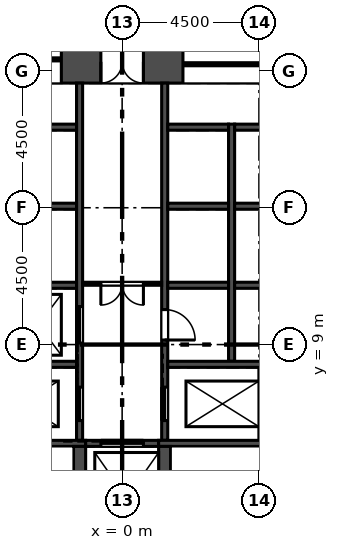
"""IFC4 building model, lengths in metres.
Left out: names, types, materials, properties, quantities, classifications, styles, units other than length and angle.
Written with IfcOpenShell. Run it as: python <this file> out.ifc"""

import sys

from ifc_helpers import new_model, si_unit, direction, frame, frame_2d, origin, place, context, subcontext, project, spatial, rectangle, extrude, element, fill, save


model = new_model("IFC4")
c1 = context("Model", 3, precision=1e-05, world=origin(), true_north=direction((0.0, 1.0)))
c2 = subcontext(c1, "Body", "Model", "MODEL_VIEW")
j1 = project(units=[si_unit("LENGTHUNIT", "METRE"), si_unit("PLANEANGLEUNIT", "RADIAN")], contexts=[c1])
p1 = place(None, origin())
s1 = spatial("IfcSite", under=j1, at=p1, CompositionType="ELEMENT")
p2 = place(p1, origin())
s2 = spatial("IfcBuilding", under=s1, at=p2, CompositionType="ELEMENT")
p3 = place(p2, frame((0.0, 0.0, 14.0)))
s3 = spatial("IfcBuildingStorey", under=s2, at=p3, CompositionType="ELEMENT", Elevation=14.0)
p4 = place(p3, frame((9.412, 18.3, 0.0), z_axis=(0.0, 0.0, 1.0), x_axis=(-1.0, 0.0, 0.0)))
e1 = element("IfcWall", 1, at=p4, inside=s3, PredefinedType="SHEAR", context=c2, shape_type="SweptSolid", body=[
    extrude(rectangle(XDim=18.823, YDim=1.4, at=frame_2d((9.412, 0.0))), origin(), (0.0, 0.0, 1.0), 6.0),
])
p5 = place(p4, frame((8.711, 0.0, 0.0)))
e2 = element("IfcOpeningElement", 2, at=p5, cuts=e1, PredefinedType="OPENING", context=c2, shape_type="SweptSolid", body=[
    extrude(rectangle(XDim=1.4, YDim=2.1, at=frame_2d((0.7, 1.05))), frame((0.0, 0.71, 0.0), z_axis=(0.0, -1.0, 0.0), x_axis=(1.0, 0.0, 0.0)), (0.0, 0.0, 1.0), 1.42),
])
p6 = place(p4, frame((11.412, 0.0, 0.0)))
e3 = element("IfcOpeningElement", 3, at=p6, cuts=e1, PredefinedType="OPENING", context=c2, shape_type="SweptSolid", body=[
    extrude(rectangle(XDim=6.0, YDim=2.4, at=frame_2d((3.0, 1.2))), frame((0.0, 0.71, 0.0), z_axis=(0.0, -1.0, 0.0), x_axis=(1.0, 0.0, 0.0)), (0.0, 0.0, 1.0), 1.42),
])
p7 = place(p4, frame((1.412, 0.0, 0.0)))
e4 = element("IfcOpeningElement", 4, at=p7, cuts=e1, PredefinedType="OPENING", context=c2, shape_type="SweptSolid", body=[
    extrude(rectangle(XDim=6.0, YDim=2.4, at=frame_2d((3.0, 1.2))), frame((0.0, 0.71, 0.0), z_axis=(0.0, -1.0, 0.0), x_axis=(1.0, 0.0, 0.0)), (0.0, 0.0, 1.0), 1.42),
])
p8 = place(p3, frame((3.6, 8.45, -0.3), z_axis=(0.0, 0.0, 1.0), x_axis=(0.0, 1.0, 0.0)))
e5 = element("IfcWall", 5, at=p8, inside=s3, PredefinedType="SOLIDWALL", context=c2, shape_type="SweptSolid", body=[
    extrude(rectangle(XDim=7.8, YDim=0.2, at=frame_2d((3.9, 0.0))), origin(), (0.0, 0.0, 1.0), 6.0),
])
p9 = place(p3, frame((-1.4, 5.85, -0.3), z_axis=(0.0, 0.0, 1.0), x_axis=(0.0, 1.0, 0.0)))
e6 = element("IfcWall", 6, at=p9, inside=s3, PredefinedType="SOLIDWALL", context=c2, shape_type="SweptSolid", body=[
    extrude(rectangle(XDim=11.75, YDim=0.2, at=frame_2d((5.875, 0.0))), origin(), (0.0, 0.0, 1.0), 6.0),
])
p10 = place(p9, frame((3.2, 0.0, 0.3)))
e7 = element("IfcOpeningElement", 7, at=p10, cuts=e6, PredefinedType="OPENING", context=c2, shape_type="SweptSolid", body=[
    extrude(rectangle(XDim=1.2, YDim=2.1, at=frame_2d((0.6, 1.05))), frame((0.0, 0.11, 0.0), z_axis=(0.0, -1.0, 0.0), x_axis=(1.0, 0.0, 0.0)), (0.0, 0.0, 1.0), 0.22),
])
p11 = place(p9, frame((0.65, 0.0, 0.3)))
e8 = element("IfcOpeningElement", 8, at=p11, cuts=e6, PredefinedType="OPENING", context=c2, shape_type="SweptSolid", body=[
    extrude(rectangle(XDim=1.1, YDim=2.1, at=frame_2d((0.55, 1.05))), frame((0.0, 0.11, 0.0), z_axis=(0.0, -1.0, 0.0), x_axis=(1.0, 0.0, 0.0)), (0.0, 0.0, 1.0), 0.22),
])
p12 = place(p3, frame((1.4, 5.85, -0.3), z_axis=(0.0, 0.0, 1.0), x_axis=(0.0, 1.0, 0.0)))
e9 = element("IfcWall", 9, at=p12, inside=s3, PredefinedType="SOLIDWALL", context=c2, shape_type="SweptSolid", body=[
    extrude(rectangle(XDim=11.75, YDim=0.2, at=frame_2d((5.875, 0.0))), origin(), (0.0, 0.0, 1.0), 6.0),
])
p13 = place(p12, frame((0.65, 0.0, 0.3)))
e10 = element("IfcOpeningElement", 10, at=p13, cuts=e9, PredefinedType="OPENING", context=c2, shape_type="SweptSolid", body=[
    extrude(rectangle(XDim=1.1, YDim=2.1, at=frame_2d((0.55, 1.05))), frame((0.0, 0.11, 0.0), z_axis=(0.0, -1.0, 0.0), x_axis=(1.0, 0.0, 0.0)), (0.0, 0.0, 1.0), 0.22),
])
p14 = place(p12, frame((3.3, 0.0, 0.3)))
e11 = element("IfcOpeningElement", 11, at=p14, cuts=e9, PredefinedType="OPENING", context=c2, shape_type="SweptSolid", body=[
    extrude(rectangle(XDim=1.0, YDim=2.1, at=frame_2d((0.5, 1.05))), frame((0.0, 0.11, 0.0), z_axis=(0.0, -1.0, 0.0), x_axis=(1.0, 0.0, 0.0)), (0.0, 0.0, 1.0), 0.22),
])
for number, where, z_axis, x_axis in (
    (12, (-5.7, 8.35, -0.3), (0.0, 0.0, 1.0), (1.0, 0.0, 0.0)),
    (13, (1.5, 8.35, -0.3), (0.0, 0.0, 1.0), (1.0, 0.0, 0.0)),
):
    element("IfcWall", number, at=place(p3, frame(where, z_axis=z_axis, x_axis=x_axis)), inside=s3, PredefinedType="SOLIDWALL", context=c2, shape_type="SweptSolid", body=[
        extrude(rectangle(XDim=4.2, YDim=0.2, at=frame_2d((2.1, 0.0))), origin(), (0.0, 0.0, 1.0), 6.0),
    ])
p15 = place(p3, frame((-12.6, 5.75, -0.3), z_axis=(0.0, 0.0, 1.0), x_axis=(1.0, 0.0, 0.0)))
e14 = element("IfcWall", 14, at=p15, inside=s3, PredefinedType="SOLIDWALL", context=c2, shape_type="SweptSolid", body=[
    extrude(rectangle(XDim=11.4, YDim=0.2, at=frame_2d((5.7, 0.0))), origin(), (0.0, 0.0, 1.0), 6.0),
])
p16 = place(p3, frame((-1.2, 5.75, -0.3), z_axis=(0.0, 0.0, 1.0), x_axis=(1.0, 0.0, 0.0)))
e15 = element("IfcWall", 15, at=p16, inside=s3, PredefinedType="SOLIDWALL", context=c2, shape_type="SweptSolid", body=[
    extrude(rectangle(XDim=2.4, YDim=0.2, at=frame_2d((1.2, 0.0))), origin(), (0.0, 0.0, 1.0), 6.0),
])
p17 = place(p16, frame((0.5, 0.0, 0.3)))
e16 = element("IfcOpeningElement", 16, at=p17, cuts=e15, PredefinedType="OPENING", context=c2, shape_type="SweptSolid", body=[
    extrude(rectangle(XDim=1.4, YDim=2.1, at=frame_2d((0.7, 1.05))), frame((0.0, 0.11, 0.0), z_axis=(0.0, -1.0, 0.0), x_axis=(1.0, 0.0, 0.0)), (0.0, 0.0, 1.0), 0.22),
])
p18 = place(p3, frame((1.2, 5.75, -0.3), z_axis=(0.0, 0.0, 1.0), x_axis=(1.0, 0.0, 0.0)))
e17 = element("IfcWall", 17, at=p18, inside=s3, PredefinedType="SOLIDWALL", context=c2, shape_type="SweptSolid", body=[
    extrude(rectangle(XDim=11.4, YDim=0.2, at=frame_2d((5.7, 0.0))), origin(), (0.0, 0.0, 1.0), 6.0),
])
for number, where, z_axis, x_axis in (
    (18, (-1.4, 2.25, -0.3), (0.0, 0.0, 1.0), (0.0, 1.0, 0.0)),
    (19, (1.4, 2.25, -0.3), (0.0, 0.0, 1.0), (0.0, 1.0, 0.0)),
):
    element("IfcWall", number, at=place(p3, frame(where, z_axis=z_axis, x_axis=x_axis)), inside=s3, PredefinedType="SOLIDWALL", context=c2, shape_type="SweptSolid", body=[
        extrude(rectangle(XDim=3.4, YDim=0.4, at=frame_2d((1.7, 0.0))), origin(), (0.0, 0.0, 1.0), 6.0),
    ])
for number, where, z_axis, x_axis in (
    (20, (-3.5, 10.95, -0.3), (0.0, 0.0, 1.0), (1.0, 0.0, 0.0)),
    (21, (-3.5, 13.55, -0.3), (0.0, 0.0, 1.0), (1.0, 0.0, 0.0)),
    (22, (-3.5, 16.15, -0.3), (0.0, 0.0, 1.0), (1.0, 0.0, 0.0)),
    (23, (3.7, 10.95, -0.3), (0.0, 0.0, 1.0), (1.0, 0.0, 0.0)),
    (24, (3.7, 13.55, -0.3), (0.0, 0.0, 1.0), (1.0, 0.0, 0.0)),
    (25, (3.7, 16.15, -0.3), (0.0, 0.0, 1.0), (1.0, 0.0, 0.0)),
    (26, (1.5, 10.95, -0.3), (0.0, 0.0, 1.0), (1.0, 0.0, 0.0)),
    (27, (1.5, 13.55, -0.3), (0.0, 0.0, 1.0), (1.0, 0.0, 0.0)),
    (28, (1.5, 16.15, -0.3), (0.0, 0.0, 1.0), (1.0, 0.0, 0.0)),
):
    element("IfcWall", number, at=place(p3, frame(where, z_axis=z_axis, x_axis=x_axis)), inside=s3, PredefinedType="SOLIDWALL", context=c2, shape_type="SweptSolid", body=[
        extrude(rectangle(XDim=2.0, YDim=0.2, at=frame_2d((1.0, 0.0))), origin(), (0.0, 0.0, 1.0), 6.0),
    ])
p19 = place(p3, frame((-1.3, 11.0, 0.0), z_axis=(0.0, 0.0, 1.0), x_axis=(1.0, 0.0, 0.0)))
e29 = element("IfcWall", 29, at=p19, inside=s3, PredefinedType="PARTITIONING", context=c2, shape_type="SweptSolid", body=[
    extrude(rectangle(XDim=2.6, YDim=0.1, at=frame_2d((1.3, 0.0))), origin(), (0.0, 0.0, 1.0), 5.7),
])
p20 = place(p19, frame((0.6, 0.0, 0.0)))
e30 = element("IfcOpeningElement", 30, at=p20, cuts=e29, PredefinedType="OPENING", context=c2, shape_type="SweptSolid", body=[
    extrude(rectangle(XDim=1.4, YDim=2.1, at=frame_2d((0.7, 1.05))), frame((0.0, 0.06, 0.0), z_axis=(0.0, -1.0, 0.0), x_axis=(1.0, 0.0, 0.0)), (0.0, 0.0, 1.0), 0.12),
])
p21 = place(p10, origin())
e31 = element("IfcDoor", 31, at=p21, inside=s3, OperationType="SLIDING_TO_LEFT", PredefinedType="DOOR", context=c2, shape_type="SweptSolid", body=[
    extrude(rectangle(XDim=1.2, YDim=2.1, at=frame_2d((0.6, 1.05))), frame((0.0, 0.025, 0.0), z_axis=(0.0, -1.0, 0.0), x_axis=(1.0, 0.0, 0.0)), (0.0, 0.0, 1.0), 0.05),
])
fill(e7, e31)
p22 = place(p11, origin())
e32 = element("IfcDoor", 32, at=p22, inside=s3, OperationType="SLIDING_TO_RIGHT", PredefinedType="DOOR", context=c2, shape_type="SweptSolid", body=[
    extrude(rectangle(XDim=1.1, YDim=2.1, at=frame_2d((0.55, 1.05))), frame((0.0, 0.025, 0.0), z_axis=(0.0, -1.0, 0.0), x_axis=(1.0, 0.0, 0.0)), (0.0, 0.0, 1.0), 0.05),
])
fill(e8, e32)
p23 = place(p13, origin())
e33 = element("IfcDoor", 33, at=p23, inside=s3, OperationType="SLIDING_TO_RIGHT", PredefinedType="DOOR", context=c2, shape_type="SweptSolid", body=[
    extrude(rectangle(XDim=1.1, YDim=2.1, at=frame_2d((0.55, 1.05))), frame((0.0, 0.025, 0.0), z_axis=(0.0, -1.0, 0.0), x_axis=(1.0, 0.0, 0.0)), (0.0, 0.0, 1.0), 0.05),
])
fill(e10, e33)
p24 = place(p17, origin())
e34 = element("IfcDoor", 34, at=p24, inside=s3, OperationType="SLIDING_TO_LEFT", PredefinedType="DOOR", context=c2, shape_type="SweptSolid", body=[
    extrude(rectangle(XDim=1.4, YDim=2.1, at=frame_2d((0.7, 1.05))), frame((0.0, 0.025, 0.0), z_axis=(0.0, -1.0, 0.0), x_axis=(1.0, 0.0, 0.0)), (0.0, 0.0, 1.0), 0.05),
])
fill(e16, e34)
p25 = place(p14, frame((1.0, 0.0, 0.0), z_axis=(0.0, 0.0, 1.0), x_axis=(-1.0, 0.0, 0.0)))
e35 = element("IfcDoor", 35, at=p25, inside=s3, OperationType="SINGLE_SWING_RIGHT", PredefinedType="DOOR", context=c2, shape_type="SweptSolid", body=[
    extrude(rectangle(XDim=1.0, YDim=2.1, at=frame_2d((0.5, 1.05))), frame((0.0, 0.025, 0.0), z_axis=(0.0, -1.0, 0.0), x_axis=(1.0, 0.0, 0.0)), (0.0, 0.0, 1.0), 0.05),
])
fill(e11, e35)
p26 = place(p20, frame((1.4, 0.0, 0.0), z_axis=(0.0, 0.0, 1.0), x_axis=(-1.0, 0.0, 0.0)))
e36 = element("IfcDoor", 36, at=p26, inside=s3, OperationType="DOUBLE_DOOR_SINGLE_SWING", PredefinedType="DOOR", context=c2, shape_type="SweptSolid", body=[
    extrude(rectangle(XDim=1.4, YDim=2.1, at=frame_2d((0.7, 1.05))), frame((0.0, 0.025, 0.0), z_axis=(0.0, -1.0, 0.0), x_axis=(1.0, 0.0, 0.0)), (0.0, 0.0, 1.0), 0.05),
])
fill(e30, e36)
p27 = place(p5, origin())
e37 = element("IfcDoor", 37, at=p27, inside=s3, OperationType="DOUBLE_DOOR_SINGLE_SWING", PredefinedType="DOOR", context=c2, shape_type="SweptSolid", body=[
    extrude(rectangle(XDim=1.4, YDim=2.1, at=frame_2d((0.7, 1.05))), frame((0.0, 0.025, 0.0), z_axis=(0.0, -1.0, 0.0), x_axis=(1.0, 0.0, 0.0)), (0.0, 0.0, 1.0), 0.05),
])
fill(e2, e37)
p28 = place(p6, origin())
e38 = element("IfcDoor", 38, at=p28, inside=s3, OperationType="DOUBLE_DOOR_SLIDING", PredefinedType="DOOR", context=c2, shape_type="SweptSolid", body=[
    extrude(rectangle(XDim=6.0, YDim=2.4, at=frame_2d((3.0, 1.2))), frame((0.0, 0.025, 0.0), z_axis=(0.0, -1.0, 0.0), x_axis=(1.0, 0.0, 0.0)), (0.0, 0.0, 1.0), 0.05),
])
fill(e3, e38)
p29 = place(p7, origin())
e39 = element("IfcDoor", 39, at=p29, inside=s3, OperationType="DOUBLE_DOOR_SLIDING", PredefinedType="DOOR", context=c2, shape_type="SweptSolid", body=[
    extrude(rectangle(XDim=6.0, YDim=2.4, at=frame_2d((3.0, 1.2))), frame((0.0, 0.025, 0.0), z_axis=(0.0, -1.0, 0.0), x_axis=(1.0, 0.0, 0.0)), (0.0, 0.0, 1.0), 0.05),
])
fill(e4, e39)
save(model, sys.argv[1])
